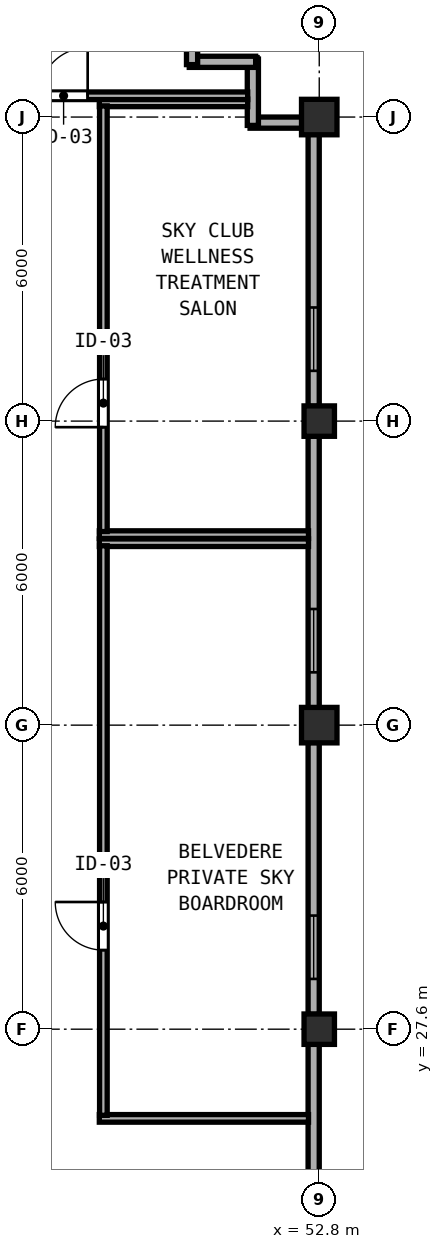
"""IFC4 building model, lengths in metres.
Left out: names, types, materials, properties, quantities, classifications, styles, units other than length and angle.
Written with IfcOpenShell. Run it as: python <this file> out.ifc"""

import sys

from ifc_helpers import new_model, si_unit, direction, frame, frame_2d, origin, origin_2d, place, context, subcontext, project, spatial, rectangle, hollow_rectangle, extrude, element, fill, save


model = new_model("IFC4")
c1 = context("Model", 3, precision=1e-05, world=origin(), true_north=direction((0.0, 1.0)))
c2 = subcontext(c1, "Body", "Model", "MODEL_VIEW")
j1 = project(units=[si_unit("LENGTHUNIT", "METRE"), si_unit("PLANEANGLEUNIT", "RADIAN")], contexts=[c1])
p1 = place(None, origin())
s1 = spatial("IfcSite", under=j1, at=p1, CompositionType="ELEMENT")
p2 = place(p1, origin())
s2 = spatial("IfcBuilding", under=s1, at=p2, CompositionType="ELEMENT")
p3 = place(p2, frame((0.0, 0.0, 309.5)))
s3 = spatial("IfcBuildingStorey", under=s2, at=p3, CompositionType="ELEMENT", Elevation=309.5)
for number, where, z_axis, x_axis in (
    (1, (52.8, 33.6, 0.0), (0.0, 0.0, 1.0), (1.0, 0.0, 0.0)),
    (2, (52.8, 45.6, 0.0), (0.0, 0.0, 1.0), (1.0, 0.0, 0.0)),
):
    element("IfcColumn", number, at=place(p3, frame(where, z_axis=z_axis, x_axis=x_axis)), inside=s3, PredefinedType="COLUMN", context=c2, shape_type="SweptSolid", body=[
        extrude(hollow_rectangle(XDim=0.7, YDim=0.7, WallThickness=0.026, at=origin_2d()), origin(), (0.0, 0.0, 1.0), 3.9),
    ])
for number, where, z_axis, x_axis in (
    (3, (52.8, 27.6, 0.0), (0.0, 0.0, 1.0), (1.0, 0.0, 0.0)),
    (4, (52.8, 39.6, 0.0), (0.0, 0.0, 1.0), (1.0, 0.0, 0.0)),
):
    element("IfcColumn", number, at=place(p3, frame(where, z_axis=z_axis, x_axis=x_axis)), inside=s3, PredefinedType="COLUMN", context=c2, shape_type="SweptSolid", body=[
        extrude(hollow_rectangle(XDim=0.6, YDim=0.6, WallThickness=0.024, at=origin_2d()), origin(), (0.0, 0.0, 1.0), 3.9),
    ])
p4 = place(p3, frame((52.69, 21.942, 0.0), z_axis=(0.0, 0.0, 1.0), x_axis=(0.0, 1.0, 0.0)))
e5 = element("IfcWall", 5, at=p4, inside=s3, PredefinedType="SOLIDWALL", context=c2, shape_type="SweptSolid", body=[
    extrude(rectangle(XDim=5.366, YDim=0.22, at=frame_2d((2.683, 0.0))), origin(), (0.0, 0.0, 1.0), 3.305),
])
p5 = place(p4, frame((0.7, 0.0, 0.85)))
e6 = element("IfcOpeningElement", 6, at=p5, cuts=e5, PredefinedType="OPENING", context=c2, shape_type="SweptSolid", body=[
    extrude(rectangle(XDim=1.25, YDim=1.95, at=frame_2d((0.625, 0.975))), frame((0.0, 0.12, 0.0), z_axis=(0.0, -1.0, 0.0), x_axis=(1.0, 0.0, 0.0)), (0.0, 0.0, 1.0), 0.24),
])
p6 = place(p3, frame((52.69, 27.892, 0.0), z_axis=(0.0, 0.0, 1.0), x_axis=(0.0, 1.0, 0.0)))
e7 = element("IfcWall", 7, at=p6, inside=s3, PredefinedType="SOLIDWALL", context=c2, shape_type="SweptSolid", body=[
    extrude(rectangle(XDim=5.366, YDim=0.22, at=frame_2d((2.683, 0.0))), origin(), (0.0, 0.0, 1.0), 3.305),
])
p7 = place(p6, frame((0.7, 0.0, 0.85)))
e8 = element("IfcOpeningElement", 8, at=p7, cuts=e7, PredefinedType="OPENING", context=c2, shape_type="SweptSolid", body=[
    extrude(rectangle(XDim=1.25, YDim=1.95, at=frame_2d((0.625, 0.975))), frame((0.0, 0.12, 0.0), z_axis=(0.0, -1.0, 0.0), x_axis=(1.0, 0.0, 0.0)), (0.0, 0.0, 1.0), 0.24),
])
p8 = place(p3, frame((52.69, 33.942, 0.0), z_axis=(0.0, 0.0, 1.0), x_axis=(0.0, 1.0, 0.0)))
e9 = element("IfcWall", 9, at=p8, inside=s3, PredefinedType="SOLIDWALL", context=c2, shape_type="SweptSolid", body=[
    extrude(rectangle(XDim=5.366, YDim=0.22, at=frame_2d((2.683, 0.0))), origin(), (0.0, 0.0, 1.0), 3.305),
])
p9 = place(p8, frame((0.7, 0.0, 0.85)))
e10 = element("IfcOpeningElement", 10, at=p9, cuts=e9, PredefinedType="OPENING", context=c2, shape_type="SweptSolid", body=[
    extrude(rectangle(XDim=1.25, YDim=1.95, at=frame_2d((0.625, 0.975))), frame((0.0, 0.12, 0.0), z_axis=(0.0, -1.0, 0.0), x_axis=(1.0, 0.0, 0.0)), (0.0, 0.0, 1.0), 0.24),
])
p10 = place(p3, frame((52.69, 39.892, 0.0), z_axis=(0.0, 0.0, 1.0), x_axis=(0.0, 1.0, 0.0)))
e11 = element("IfcWall", 11, at=p10, inside=s3, PredefinedType="SOLIDWALL", context=c2, shape_type="SweptSolid", body=[
    extrude(rectangle(XDim=5.366, YDim=0.22, at=frame_2d((2.683, 0.0))), origin(), (0.0, 0.0, 1.0), 3.305),
])
p11 = place(p10, frame((0.7, 0.0, 0.85)))
e12 = element("IfcOpeningElement", 12, at=p11, cuts=e11, PredefinedType="OPENING", context=c2, shape_type="SweptSolid", body=[
    extrude(rectangle(XDim=1.25, YDim=1.95, at=frame_2d((0.625, 0.975))), frame((0.0, 0.12, 0.0), z_axis=(0.0, -1.0, 0.0), x_axis=(1.0, 0.0, 0.0)), (0.0, 0.0, 1.0), 0.24),
])
p12 = place(p3, frame((52.458, 45.49, 0.0), z_axis=(0.0, 0.0, 1.0), x_axis=(-1.0, 0.0, 0.0)))
e13 = element("IfcWall", 13, at=p12, inside=s3, PredefinedType="SOLIDWALL", context=c2, shape_type="SweptSolid", body=[
    extrude(rectangle(XDim=1.023, YDim=0.22, at=frame_2d((0.511, 0.0))), origin(), (0.0, 0.0, 1.0), 3.66),
])
p13 = place(p3, frame((51.49, 45.435, 0.0), z_axis=(0.0, 0.0, 1.0), x_axis=(0.0, 1.0, 0.0)))
e14 = element("IfcWall", 14, at=p13, inside=s3, PredefinedType="SOLIDWALL", context=c2, shape_type="SweptSolid", body=[
    extrude(rectangle(XDim=1.31, YDim=0.22, at=frame_2d((0.655, 0.0))), origin(), (0.0, 0.0, 1.0), 3.66),
])
p14 = place(p3, frame((51.545, 46.69, 0.0), z_axis=(0.0, 0.0, 1.0), x_axis=(-1.0, 0.0, 0.0)))
e15 = element("IfcWall", 15, at=p14, inside=s3, PredefinedType="SOLIDWALL", context=c2, shape_type="SweptSolid", body=[
    extrude(rectangle(XDim=1.31, YDim=0.22, at=frame_2d((0.655, 0.0))), origin(), (0.0, 0.0, 1.0), 3.66),
])
p15 = place(p3, frame((50.29, 46.635, 0.0), z_axis=(0.0, 0.0, 1.0), x_axis=(0.0, 1.0, 0.0)))
e16 = element("IfcWall", 16, at=p15, inside=s3, PredefinedType="SOLIDWALL", context=c2, shape_type="SweptSolid", body=[
    extrude(rectangle(XDim=1.535, YDim=0.22, at=frame_2d((0.768, 0.0))), origin(), (0.0, 0.0, 1.0), 3.66),
])
for number, where, z_axis, x_axis in (
    (17, (48.46, 37.2, 0.0), (0.0, 0.0, 1.0), (1.0, 0.0, 0.0)),
    (18, (48.46, 25.84, 0.0), (0.0, 0.0, 1.0), (1.0, 0.0, 0.0)),
):
    element("IfcWall", number, at=place(p3, frame(where, z_axis=z_axis, x_axis=x_axis)), inside=s3, PredefinedType="PARTITIONING", context=c2, shape_type="SweptSolid", body=[
        extrude(rectangle(XDim=4.128, YDim=0.15, at=frame_2d((2.064, 0.0))), origin(), (0.0, 0.0, 1.0), 3.66),
    ])
p16 = place(p3, frame((48.54, 25.9, 0.0), z_axis=(0.0, 0.0, 1.0), x_axis=(0.0, 1.0, 0.0)))
e19 = element("IfcWall", 19, at=p16, inside=s3, PredefinedType="PARTITIONING", context=c2, shape_type="SweptSolid", body=[
    extrude(rectangle(XDim=11.24, YDim=0.15, at=frame_2d((5.62, 0.0))), origin(), (0.0, 0.0, 1.0), 3.66),
])
p17 = place(p16, frame((3.26, 0.0, 0.0)))
e20 = element("IfcOpeningElement", 20, at=p17, cuts=e19, PredefinedType="OPENING", context=c2, shape_type="SweptSolid", body=[
    extrude(rectangle(XDim=0.95, YDim=2.12, at=frame_2d((0.475, 1.06))), frame((0.0, 0.085, 0.0), z_axis=(0.0, -1.0, 0.0), x_axis=(1.0, 0.0, 0.0)), (0.0, 0.0, 1.0), 0.17),
])
p18 = place(p3, frame((48.46, 45.88, 0.0), z_axis=(0.0, 0.0, 1.0), x_axis=(1.0, 0.0, 0.0)))
e21 = element("IfcWall", 21, at=p18, inside=s3, PredefinedType="PARTITIONING", context=c2, shape_type="SweptSolid", body=[
    extrude(rectangle(XDim=2.928, YDim=0.15, at=frame_2d((1.464, 0.0))), origin(), (0.0, 0.0, 1.0), 3.66),
])
p19 = place(p3, frame((48.46, 37.36, 0.0), z_axis=(0.0, 0.0, 1.0), x_axis=(1.0, 0.0, 0.0)))
e22 = element("IfcWall", 22, at=p19, inside=s3, PredefinedType="PARTITIONING", context=c2, shape_type="SweptSolid", body=[
    extrude(rectangle(XDim=4.128, YDim=0.15, at=frame_2d((2.064, 0.0))), origin(), (0.0, 0.0, 1.0), 3.66),
])
p20 = place(p3, frame((48.54, 37.42, 0.0), z_axis=(0.0, 0.0, 1.0), x_axis=(0.0, 1.0, 0.0)))
e23 = element("IfcWall", 23, at=p20, inside=s3, PredefinedType="PARTITIONING", context=c2, shape_type="SweptSolid", body=[
    extrude(rectangle(XDim=8.4, YDim=0.15, at=frame_2d((4.2, 0.0))), origin(), (0.0, 0.0, 1.0), 3.66),
])
p21 = place(p20, frame((2.06, 0.0, 0.0)))
e24 = element("IfcOpeningElement", 24, at=p21, cuts=e23, PredefinedType="OPENING", context=c2, shape_type="SweptSolid", body=[
    extrude(rectangle(XDim=0.95, YDim=2.12, at=frame_2d((0.475, 1.06))), frame((0.0, 0.085, 0.0), z_axis=(0.0, -1.0, 0.0), x_axis=(1.0, 0.0, 0.0)), (0.0, 0.0, 1.0), 0.17),
])
p22 = place(p3, frame((45.385, 46.02, 0.0), z_axis=(0.0, 0.0, 1.0), x_axis=(1.0, 0.0, 0.0)))
e25 = element("IfcWall", 25, at=p22, inside=s3, PredefinedType="PARTITIONING", context=c2, shape_type="SweptSolid", body=[
    extrude(rectangle(XDim=6.003, YDim=0.15, at=frame_2d((3.001, 0.0))), origin(), (0.0, 0.0, 1.0), 3.66),
])
p23 = place(p22, frame((1.895, 0.0, 0.0)))
e26 = element("IfcOpeningElement", 26, at=p23, cuts=e25, PredefinedType="OPENING", context=c2, shape_type="SweptSolid", body=[
    extrude(rectangle(XDim=0.95, YDim=2.12, at=frame_2d((0.475, 1.06))), frame((0.0, 0.085, 0.0), z_axis=(0.0, -1.0, 0.0), x_axis=(1.0, 0.0, 0.0)), (0.0, 0.0, 1.0), 0.17),
])
p24 = place(p7, origin())
e27 = element("IfcWindow", 27, at=p24, inside=s3, PartitioningType="SINGLE_PANEL", PredefinedType="WINDOW", context=c2, shape_type="SweptSolid", body=[
    extrude(rectangle(XDim=1.25, YDim=1.95, at=frame_2d((0.625, 0.975))), frame((0.0, 0.03, 0.0), z_axis=(0.0, -1.0, 0.0), x_axis=(1.0, 0.0, 0.0)), (0.0, 0.0, 1.0), 0.06),
])
fill(e8, e27)
p25 = place(p9, origin())
e28 = element("IfcWindow", 28, at=p25, inside=s3, PartitioningType="SINGLE_PANEL", PredefinedType="WINDOW", context=c2, shape_type="SweptSolid", body=[
    extrude(rectangle(XDim=1.25, YDim=1.95, at=frame_2d((0.625, 0.975))), frame((0.0, 0.03, 0.0), z_axis=(0.0, -1.0, 0.0), x_axis=(1.0, 0.0, 0.0)), (0.0, 0.0, 1.0), 0.06),
])
fill(e10, e28)
p26 = place(p11, origin())
e29 = element("IfcWindow", 29, at=p26, inside=s3, PartitioningType="SINGLE_PANEL", PredefinedType="WINDOW", context=c2, shape_type="SweptSolid", body=[
    extrude(rectangle(XDim=1.25, YDim=1.95, at=frame_2d((0.625, 0.975))), frame((0.0, 0.03, 0.0), z_axis=(0.0, -1.0, 0.0), x_axis=(1.0, 0.0, 0.0)), (0.0, 0.0, 1.0), 0.06),
])
fill(e12, e29)
p27 = place(p17, origin())
e30 = element("IfcDoor", 30, at=p27, inside=s3, OperationType="SINGLE_SWING_RIGHT", PredefinedType="DOOR", context=c2, shape_type="SweptSolid", body=[
    extrude(rectangle(XDim=0.95, YDim=2.12, at=frame_2d((0.475, 1.06))), frame((0.0, 0.025, 0.0), z_axis=(0.0, -1.0, 0.0), x_axis=(1.0, 0.0, 0.0)), (0.0, 0.0, 1.0), 0.05),
])
fill(e20, e30)
p28 = place(p21, origin())
e31 = element("IfcDoor", 31, at=p28, inside=s3, OperationType="SINGLE_SWING_LEFT", PredefinedType="DOOR", context=c2, shape_type="SweptSolid", body=[
    extrude(rectangle(XDim=0.95, YDim=2.12, at=frame_2d((0.475, 1.06))), frame((0.0, 0.025, 0.0), z_axis=(0.0, -1.0, 0.0), x_axis=(1.0, 0.0, 0.0)), (0.0, 0.0, 1.0), 0.05),
])
fill(e24, e31)
p29 = place(p23, origin())
e32 = element("IfcDoor", 32, at=p29, inside=s3, OperationType="SINGLE_SWING_RIGHT", PredefinedType="DOOR", context=c2, shape_type="SweptSolid", body=[
    extrude(rectangle(XDim=0.95, YDim=2.12, at=frame_2d((0.475, 1.06))), frame((0.0, 0.025, 0.0), z_axis=(0.0, -1.0, 0.0), x_axis=(1.0, 0.0, 0.0)), (0.0, 0.0, 1.0), 0.05),
])
fill(e26, e32)
save(model, sys.argv[1])
